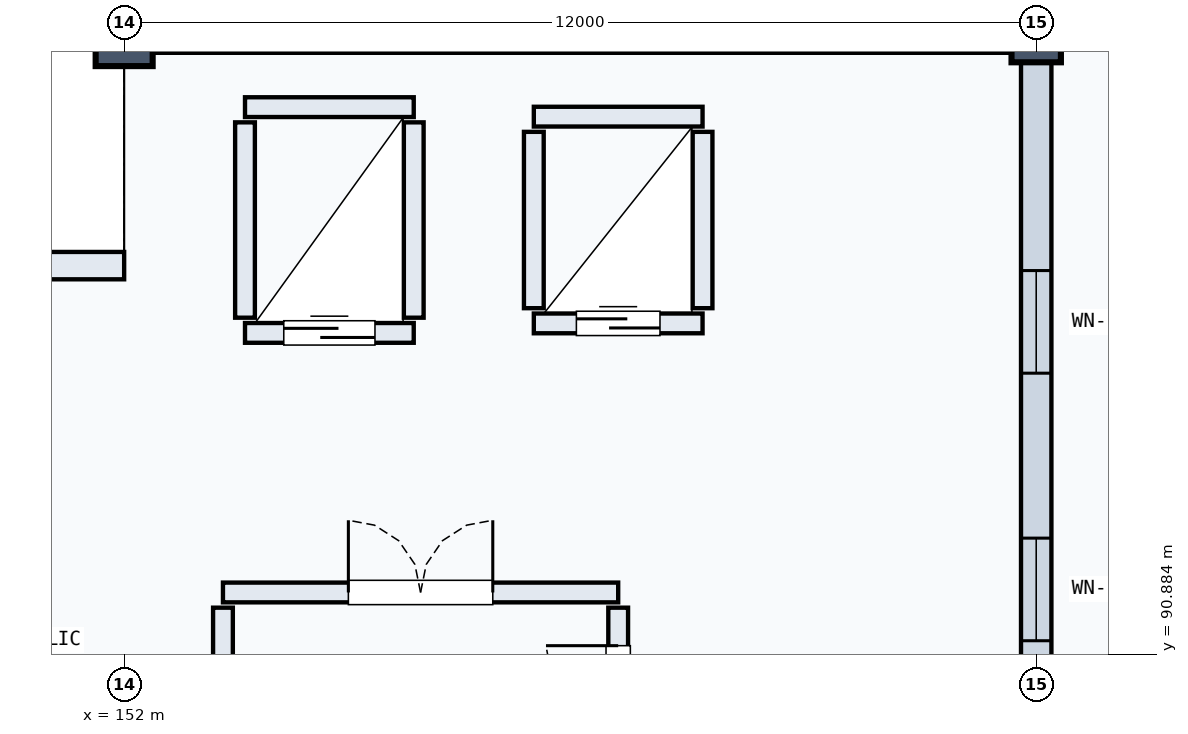
"""IFC4 building model, lengths in metres.
Left out: names, types, materials, properties, quantities, classifications, styles, units other than length and angle.
Written with IfcOpenShell. Run it as: python <this file> out.ifc"""

import sys

from ifc_helpers import new_model, si_unit, direction, frame, frame_2d, origin, origin_2d, place, context, subcontext, project, spatial, rectangle, circle, extrude, element, fill, save


model = new_model("IFC4")
c1 = context("Model", 3, precision=1e-05, world=origin(), true_north=direction((0.0, 1.0)))
c2 = subcontext(c1, "Body", "Model", "MODEL_VIEW")
j1 = project(units=[si_unit("LENGTHUNIT", "METRE"), si_unit("PLANEANGLEUNIT", "RADIAN")], contexts=[c1])
p1 = place(None, origin())
s1 = spatial("IfcSite", under=j1, at=p1, CompositionType="ELEMENT")
p2 = place(p1, origin())
s2 = spatial("IfcBuilding", under=s1, at=p2, CompositionType="ELEMENT")
p3 = place(p2, frame((0.0, 0.0, 14.7)))
s3 = spatial("IfcBuildingStorey", under=s2, at=p3, CompositionType="ELEMENT", Elevation=14.7)
p4 = place(p3, frame((152.0, 99.0, 0.0), z_axis=(0.0, 0.0, 1.0), x_axis=(1.0, 0.0, 0.0)))
e1 = element("IfcColumn", 1, at=p4, inside=s3, PredefinedType="COLUMN", context=c2, shape_type="SweptSolid", body=[
    extrude(circle(Radius=0.375, at=origin_2d()), origin(), (0.0, 0.0, 1.0), 4.8),
])
p5 = place(p3, frame((164.0, 99.0, 0.0), z_axis=(0.0, 0.0, 1.0), x_axis=(1.0, 0.0, 0.0)))
e2 = element("IfcColumn", 2, at=p5, inside=s3, PredefinedType="COLUMN", context=c2, shape_type="SweptSolid", body=[
    extrude(circle(Radius=0.325, at=origin_2d()), origin(), (0.0, 0.0, 1.0), 4.8),
])
p6 = place(p3, frame((140.0, 96.0, 0.0), z_axis=(0.0, 0.0, 1.0), x_axis=(1.0, 0.0, 0.0)))
e3 = element("IfcWall", 3, at=p6, inside=s3, PredefinedType="SOLIDWALL", context=c2, shape_type="SweptSolid", body=[
    extrude(rectangle(XDim=12.0, YDim=0.36, at=frame_2d((6.0, 0.0))), origin(), (0.0, 0.0, 1.0), 3.64),
])
p7 = place(p6, frame((4.85, 0.0, 0.85)))
e4 = element("IfcOpeningElement", 4, at=p7, cuts=e3, PredefinedType="OPENING", context=c2, shape_type="SweptSolid", body=[
    extrude(rectangle(XDim=2.3, YDim=2.05, at=frame_2d((1.15, 1.025))), frame((0.0, 0.19, 0.0), z_axis=(0.0, -1.0, 0.0), x_axis=(1.0, 0.0, 0.0)), (0.0, 0.0, 1.0), 0.38),
])
p8 = place(p3, frame((152.22, 99.0, 0.0), z_axis=(0.0, 0.0, 1.0), x_axis=(1.0, 0.0, 0.0)))
e5 = element("IfcWall", 5, at=p8, inside=s3, PredefinedType="SOLIDWALL", context=c2, shape_type="SweptSolid", body=[
    extrude(rectangle(XDim=11.56, YDim=0.4, at=frame_2d((5.78, 0.0))), origin(), (0.0, 0.0, 1.0), 3.64),
])
p9 = place(p8, frame((3.178, 0.0, 0.8)))
e6 = element("IfcOpeningElement", 6, at=p9, cuts=e5, PredefinedType="OPENING", context=c2, shape_type="SweptSolid", body=[
    extrude(rectangle(XDim=1.35, YDim=2.1, at=frame_2d((0.675, 1.05))), frame((0.0, 0.21, 0.0), z_axis=(0.0, -1.0, 0.0), x_axis=(1.0, 0.0, 0.0)), (0.0, 0.0, 1.0), 0.42),
])
p10 = place(p8, frame((7.032, 0.0, 0.8)))
e7 = element("IfcOpeningElement", 7, at=p10, cuts=e5, PredefinedType="OPENING", context=c2, shape_type="SweptSolid", body=[
    extrude(rectangle(XDim=1.35, YDim=2.1, at=frame_2d((0.675, 1.05))), frame((0.0, 0.21, 0.0), z_axis=(0.0, -1.0, 0.0), x_axis=(1.0, 0.0, 0.0)), (0.0, 0.0, 1.0), 0.42),
])
p11 = place(p3, frame((164.0, 88.22, 0.0), z_axis=(0.0, 0.0, 1.0), x_axis=(0.0, 1.0, 0.0)))
e8 = element("IfcWall", 8, at=p11, inside=s3, PredefinedType="SOLIDWALL", context=c2, shape_type="SweptSolid", body=[
    extrude(rectangle(XDim=10.56, YDim=0.4, at=frame_2d((5.28, 0.0))), origin(), (0.0, 0.0, 1.0), 3.79),
])
p12 = place(p11, frame((2.845, 0.0, 0.8)))
e9 = element("IfcOpeningElement", 9, at=p12, cuts=e8, PredefinedType="OPENING", context=c2, shape_type="SweptSolid", body=[
    extrude(rectangle(XDim=1.35, YDim=2.1, at=frame_2d((0.675, 1.05))), frame((0.0, 0.21, 0.0), z_axis=(0.0, -1.0, 0.0), x_axis=(1.0, 0.0, 0.0)), (0.0, 0.0, 1.0), 0.42),
])
p13 = place(p11, frame((6.365, 0.0, 0.8)))
e10 = element("IfcOpeningElement", 10, at=p13, cuts=e8, PredefinedType="OPENING", context=c2, shape_type="SweptSolid", body=[
    extrude(rectangle(XDim=1.35, YDim=2.1, at=frame_2d((0.675, 1.05))), frame((0.0, 0.21, 0.0), z_axis=(0.0, -1.0, 0.0), x_axis=(1.0, 0.0, 0.0)), (0.0, 0.0, 1.0), 0.42),
])
p14 = place(p3, frame((153.59, 95.115, 0.0), z_axis=(0.0, 0.0, 1.0), x_axis=(1.0, 0.0, 0.0)))
e11 = element("IfcWall", 11, at=p14, inside=s3, PredefinedType="SOLIDWALL", context=c2, shape_type="SweptSolid", body=[
    extrude(rectangle(XDim=2.22, YDim=0.26, at=frame_2d((1.11, 0.0))), origin(), (0.0, 0.0, 1.0), 4.46),
])
p15 = place(p14, frame((0.51, 0.0, 0.0)))
e12 = element("IfcOpeningElement", 12, at=p15, cuts=e11, PredefinedType="OPENING", context=c2, shape_type="SweptSolid", body=[
    extrude(rectangle(XDim=1.2, YDim=2.2, at=frame_2d((0.6, 1.1))), frame((0.0, 0.14, 0.0), z_axis=(0.0, -1.0, 0.0), x_axis=(1.0, 0.0, 0.0)), (0.0, 0.0, 1.0), 0.28),
])
p16 = place(p3, frame((153.59, 98.085, 0.0), z_axis=(0.0, 0.0, 1.0), x_axis=(1.0, 0.0, 0.0)))
e13 = element("IfcWall", 13, at=p16, inside=s3, PredefinedType="SOLIDWALL", context=c2, shape_type="SweptSolid", body=[
    extrude(rectangle(XDim=2.22, YDim=0.26, at=frame_2d((1.11, 0.0))), origin(), (0.0, 0.0, 1.0), 4.46),
])
for number, where, z_axis, x_axis in (
    (14, (153.59, 95.315, 0.0), (0.0, 0.0, 1.0), (0.0, 1.0, 0.0)),
    (15, (155.81, 95.315, 0.0), (0.0, 0.0, 1.0), (0.0, 1.0, 0.0)),
):
    element("IfcWall", number, at=place(p3, frame(where, z_axis=z_axis, x_axis=x_axis)), inside=s3, PredefinedType="SOLIDWALL", context=c2, shape_type="SweptSolid", body=[
        extrude(rectangle(XDim=2.57, YDim=0.26, at=frame_2d((1.285, 0.0))), origin(), (0.0, 0.0, 1.0), 4.46),
    ])
p17 = place(p3, frame((157.39, 95.24, 0.0), z_axis=(0.0, 0.0, 1.0), x_axis=(1.0, 0.0, 0.0)))
e16 = element("IfcWall", 16, at=p17, inside=s3, PredefinedType="SOLIDWALL", context=c2, shape_type="SweptSolid", body=[
    extrude(rectangle(XDim=2.22, YDim=0.26, at=frame_2d((1.11, 0.0))), origin(), (0.0, 0.0, 1.0), 4.46),
])
p18 = place(p17, frame((0.56, 0.0, 0.0)))
e17 = element("IfcOpeningElement", 17, at=p18, cuts=e16, PredefinedType="OPENING", context=c2, shape_type="SweptSolid", body=[
    extrude(rectangle(XDim=1.1, YDim=2.15, at=frame_2d((0.55, 1.075))), frame((0.0, 0.14, 0.0), z_axis=(0.0, -1.0, 0.0), x_axis=(1.0, 0.0, 0.0)), (0.0, 0.0, 1.0), 0.28),
])
p19 = place(p3, frame((157.39, 97.96, 0.0), z_axis=(0.0, 0.0, 1.0), x_axis=(1.0, 0.0, 0.0)))
e18 = element("IfcWall", 18, at=p19, inside=s3, PredefinedType="SOLIDWALL", context=c2, shape_type="SweptSolid", body=[
    extrude(rectangle(XDim=2.22, YDim=0.26, at=frame_2d((1.11, 0.0))), origin(), (0.0, 0.0, 1.0), 4.46),
])
for number, where, z_axis, x_axis in (
    (19, (157.39, 95.44, 0.0), (0.0, 0.0, 1.0), (0.0, 1.0, 0.0)),
    (20, (159.61, 95.44, 0.0), (0.0, 0.0, 1.0), (0.0, 1.0, 0.0)),
):
    element("IfcWall", number, at=place(p3, frame(where, z_axis=z_axis, x_axis=x_axis)), inside=s3, PredefinedType="SOLIDWALL", context=c2, shape_type="SweptSolid", body=[
        extrude(rectangle(XDim=2.32, YDim=0.26, at=frame_2d((1.16, 0.0))), origin(), (0.0, 0.0, 1.0), 4.46),
    ])
p20 = place(p3, frame((153.3, 91.7, 0.0), z_axis=(0.0, 0.0, 1.0), x_axis=(1.0, 0.0, 0.0)))
e21 = element("IfcWall", 21, at=p20, inside=s3, PredefinedType="SOLIDWALL", context=c2, shape_type="SweptSolid", body=[
    extrude(rectangle(XDim=5.2, YDim=0.26, at=frame_2d((2.6, 0.0))), origin(), (0.0, 0.0, 1.0), 4.46),
])
p21 = place(p20, frame((1.65, 0.0, 0.0)))
e22 = element("IfcOpeningElement", 22, at=p21, cuts=e21, PredefinedType="OPENING", context=c2, shape_type="SweptSolid", body=[
    extrude(rectangle(XDim=1.9, YDim=2.2, at=frame_2d((0.95, 1.1))), frame((0.0, 0.14, 0.0), z_axis=(0.0, -1.0, 0.0), x_axis=(1.0, 0.0, 0.0)), (0.0, 0.0, 1.0), 0.28),
])
p22 = place(p3, frame((153.3, 88.6, 0.0), z_axis=(0.0, 0.0, 1.0), x_axis=(0.0, 1.0, 0.0)))
e23 = element("IfcWall", 23, at=p22, inside=s3, PredefinedType="SOLIDWALL", context=c2, shape_type="SweptSolid", body=[
    extrude(rectangle(XDim=2.9, YDim=0.26, at=frame_2d((1.45, 0.0))), origin(), (0.0, 0.0, 1.0), 4.46),
])
p23 = place(p3, frame((158.5, 88.6, 0.0), z_axis=(0.0, 0.0, 1.0), x_axis=(0.0, 1.0, 0.0)))
e24 = element("IfcWall", 24, at=p23, inside=s3, PredefinedType="SOLIDWALL", context=c2, shape_type="SweptSolid", body=[
    extrude(rectangle(XDim=2.9, YDim=0.26, at=frame_2d((1.45, 0.0))), origin(), (0.0, 0.0, 1.0), 4.46),
])
p24 = place(p23, frame((0.5, 0.0, 0.0)))
e25 = element("IfcOpeningElement", 25, at=p24, cuts=e24, PredefinedType="OPENING", context=c2, shape_type="SweptSolid", body=[
    extrude(rectangle(XDim=1.9, YDim=2.2, at=frame_2d((0.95, 1.1))), frame((0.0, 0.14, 0.0), z_axis=(0.0, -1.0, 0.0), x_axis=(1.0, 0.0, 0.0)), (0.0, 0.0, 1.0), 0.28),
])
p25 = place(p12, origin())
e26 = element("IfcWindow", 26, at=p25, inside=s3, PartitioningType="SINGLE_PANEL", PredefinedType="WINDOW", context=c2, shape_type="SweptSolid", body=[
    extrude(rectangle(XDim=1.35, YDim=2.1, at=frame_2d((0.675, 1.05))), frame((0.0, 0.03, 0.0), z_axis=(0.0, -1.0, 0.0), x_axis=(1.0, 0.0, 0.0)), (0.0, 0.0, 1.0), 0.06),
])
fill(e9, e26)
p26 = place(p13, origin())
e27 = element("IfcWindow", 27, at=p26, inside=s3, PartitioningType="SINGLE_PANEL", PredefinedType="WINDOW", context=c2, shape_type="SweptSolid", body=[
    extrude(rectangle(XDim=1.35, YDim=2.1, at=frame_2d((0.675, 1.05))), frame((0.0, 0.03, 0.0), z_axis=(0.0, -1.0, 0.0), x_axis=(1.0, 0.0, 0.0)), (0.0, 0.0, 1.0), 0.06),
])
fill(e10, e27)
p27 = place(p15, origin())
e28 = element("IfcDoor", 28, at=p27, inside=s3, OperationType="SLIDING_TO_LEFT", PredefinedType="DOOR", context=c2, shape_type="SweptSolid", body=[
    extrude(rectangle(XDim=1.2, YDim=2.2, at=frame_2d((0.6, 1.1))), frame((0.0, 0.025, 0.0), z_axis=(0.0, -1.0, 0.0), x_axis=(1.0, 0.0, 0.0)), (0.0, 0.0, 1.0), 0.05),
])
fill(e12, e28)
p28 = place(p18, origin())
e29 = element("IfcDoor", 29, at=p28, inside=s3, OperationType="SLIDING_TO_LEFT", PredefinedType="DOOR", context=c2, shape_type="SweptSolid", body=[
    extrude(rectangle(XDim=1.1, YDim=2.15, at=frame_2d((0.55, 1.075))), frame((0.0, 0.025, 0.0), z_axis=(0.0, -1.0, 0.0), x_axis=(1.0, 0.0, 0.0)), (0.0, 0.0, 1.0), 0.05),
])
fill(e17, e29)
p29 = place(p21, origin())
e30 = element("IfcDoor", 30, at=p29, inside=s3, OperationType="DOUBLE_DOOR_SINGLE_SWING", PredefinedType="DOOR", context=c2, shape_type="SweptSolid", body=[
    extrude(rectangle(XDim=1.9, YDim=2.2, at=frame_2d((0.95, 1.1))), frame((0.0, 0.025, 0.0), z_axis=(0.0, -1.0, 0.0), x_axis=(1.0, 0.0, 0.0)), (0.0, 0.0, 1.0), 0.05),
])
fill(e22, e30)
p30 = place(p24, origin())
e31 = element("IfcDoor", 31, at=p30, inside=s3, OperationType="DOUBLE_DOOR_SINGLE_SWING", PredefinedType="DOOR", context=c2, shape_type="SweptSolid", body=[
    extrude(rectangle(XDim=1.9, YDim=2.2, at=frame_2d((0.95, 1.1))), frame((0.0, 0.025, 0.0), z_axis=(0.0, -1.0, 0.0), x_axis=(1.0, 0.0, 0.0)), (0.0, 0.0, 1.0), 0.05),
])
fill(e25, e31)
save(model, sys.argv[1])
